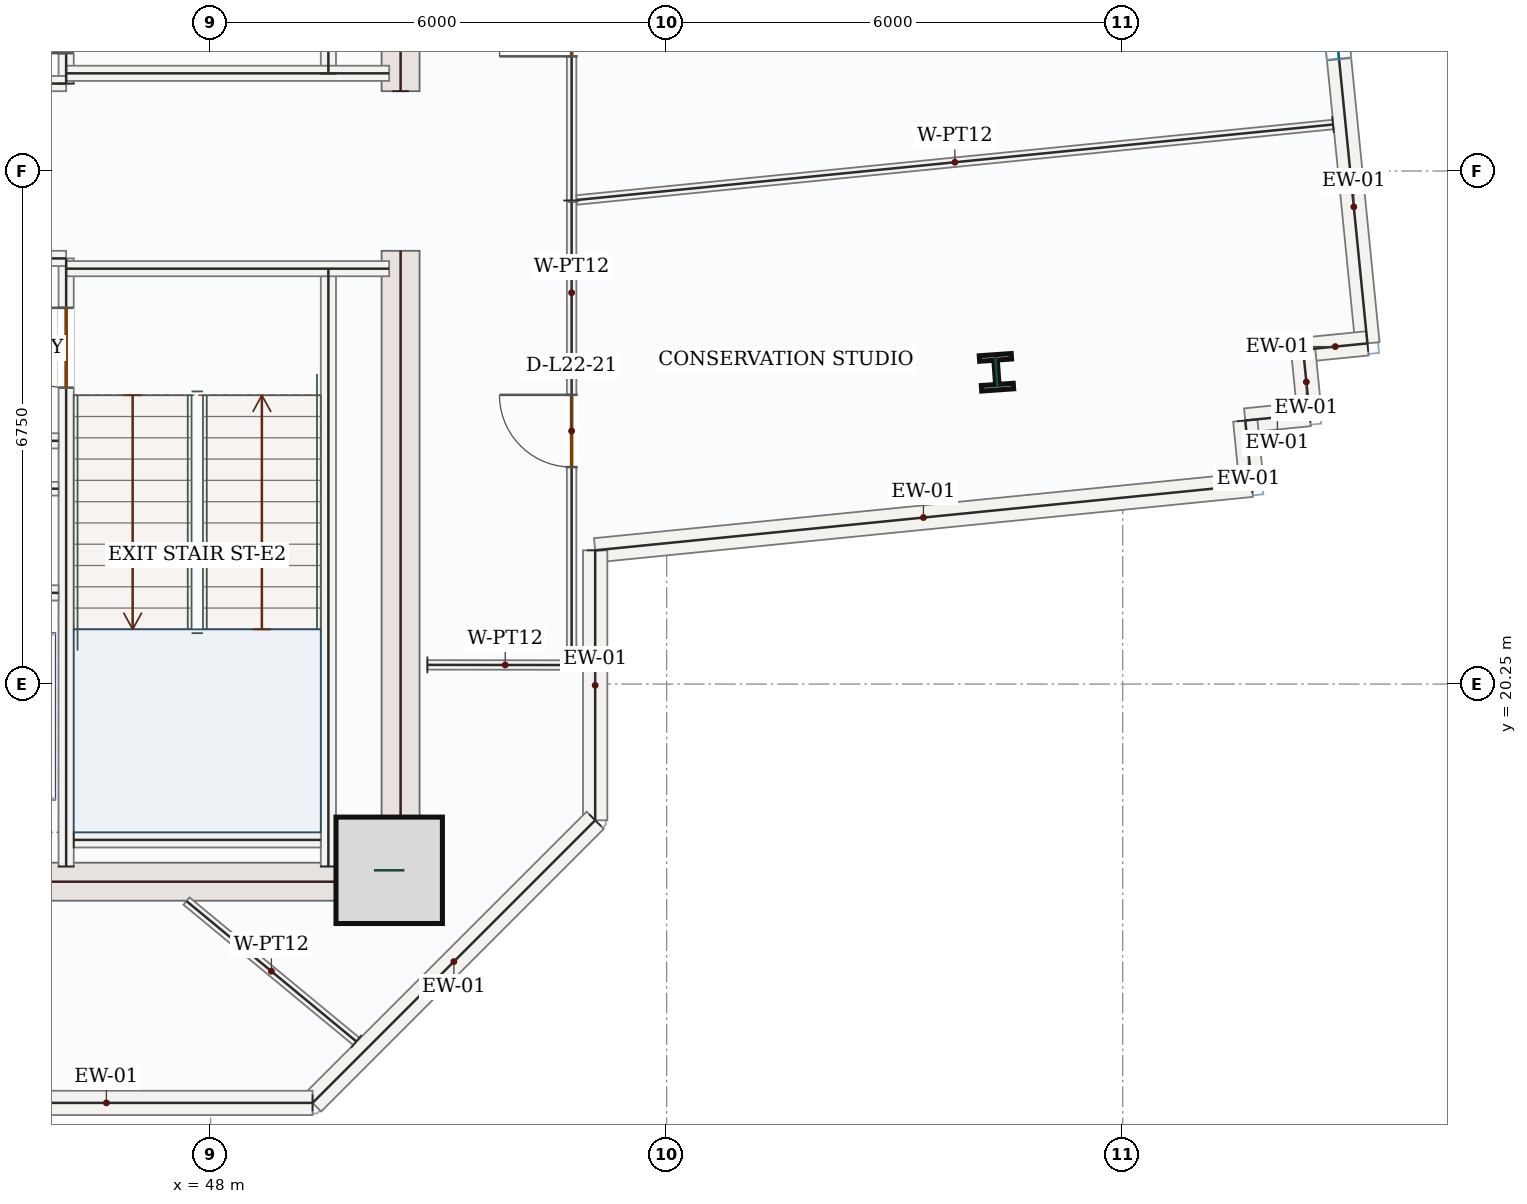
"""IFC4 building model, lengths in metres.
Left out: names, types, materials, properties, quantities, classifications, styles, units other than length and angle.
Written with IfcOpenShell. Run it as: python <this file> out.ifc"""

import sys

from ifc_helpers import new_model, si_unit, direction, frame, frame_2d, origin, origin_2d, place, context, subcontext, project, spatial, rectangle, i_section, extrude, source, transform, mapped, element, fill, save


model = new_model("IFC4")
c1 = context("Model", 3, precision=1e-05, world=origin(), true_north=direction((0.0, 1.0)))
c2 = subcontext(c1, "Body", "Model", "MODEL_VIEW")
j1 = project(units=[si_unit("LENGTHUNIT", "METRE"), si_unit("PLANEANGLEUNIT", "RADIAN")], contexts=[c1])
p1 = place(None, origin())
s1 = spatial("IfcSite", under=j1, at=p1, CompositionType="ELEMENT")
p2 = place(p1, origin())
s2 = spatial("IfcBuilding", under=s1, at=p2, CompositionType="ELEMENT")
p3 = place(p2, frame((0.0, 0.0, 100.5)))
s3 = spatial("IfcBuildingStorey", under=s2, at=p3, CompositionType="ELEMENT", Elevation=100.5)
m1 = source(origin(), c2, "Body", "SweptSolid", [
    extrude(rectangle(XDim=8.55, YDim=0.5, at=frame_2d((4.275, 0.0))), origin(), (0.0, 0.0, 1.0), 3.95),
])
for number, where, z_axis, x_axis in (
    (1, (50.5, 17.4, 0.0), (0.0, 0.0, 1.0), (0.0, 1.0, 0.0)),
    (2, (50.5, 28.05, 0.0), (0.0, 0.0, 1.0), (0.0, 1.0, 0.0)),
):
    element("IfcWall", number, at=place(p3, frame(where, z_axis=z_axis, x_axis=x_axis)), inside=s3, PredefinedType="SHEAR", context=c2, shape_type="MappedRepresentation", body=[
        mapped(m1, transform((0.0, 0.0, 0.0), x_axis=(1.0, 0.0, 0.0), y_axis=(0.0, 1.0, 0.0), z_axis=(0.0, 0.0, 1.0), scale=1.0)),
    ])
m2 = source(origin(), c2, "Body", "SweptSolid", [
    extrude(rectangle(XDim=7.0, YDim=0.5, at=frame_2d((3.5, 0.0))), origin(), (0.0, 0.0, 1.0), 3.95),
])
p4 = place(p3, frame((43.25, 17.65, 0.0), z_axis=(0.0, 0.0, 1.0), x_axis=(1.0, 0.0, 0.0)))
e3 = element("IfcWall", 3, at=p4, inside=s3, PredefinedType="SHEAR", context=c2, shape_type="MappedRepresentation", body=[
    mapped(m2, transform((0.0, 0.0, 0.0), x_axis=(1.0, 0.0, 0.0), y_axis=(0.0, 1.0, 0.0), z_axis=(0.0, 0.0, 1.0), scale=1.0)),
])
m3 = source(origin(), c2, "Body", "SweptSolid", [
    extrude(rectangle(XDim=1.4, YDim=1.4, at=origin_2d()), origin(), (0.0, 0.0, 1.0), 4.2),
])
p5 = place(p3, frame((50.35, 17.8, 0.0), z_axis=(0.0, 0.0, 1.0), x_axis=(1.0, 0.0, 0.0)))
e4 = element("IfcColumn", 4, at=p5, inside=s3, PredefinedType="COLUMN", context=c2, shape_type="MappedRepresentation", body=[
    mapped(m3, transform((0.0, 0.0, 0.0), x_axis=(1.0, 0.0, 0.0), y_axis=(0.0, 1.0, 0.0), z_axis=(0.0, 0.0, 1.0), scale=1.0)),
])
m4 = source(origin(), c2, "Body", "SweptSolid", [
    extrude(i_section(OverallWidth=0.421, OverallDepth=0.465, WebThickness=0.045, FlangeThickness=0.073, FilletRadius=0.018, at=origin_2d()), origin(), (0.0, 0.0, 1.0), 4.2),
])
p6 = place(p3, frame((58.339, 24.352, 0.0), z_axis=(0.0, 0.0, 1.0), x_axis=(0.99756405026, 0.069756473744, 0.0)))
e5 = element("IfcColumn", 5, at=p6, inside=s3, PredefinedType="COLUMN", context=c2, shape_type="MappedRepresentation", body=[
    mapped(m4, transform((0.0, 0.0, 0.0), x_axis=(1.0, 0.0, 0.0), y_axis=(0.0, 1.0, 0.0), z_axis=(0.0, 0.0, 1.0), scale=1.0)),
])
p7 = place(p3, frame((62.235, 34.603, 0.0), z_axis=(0.0, 0.0, 1.0), x_axis=(0.099303907908, -0.995057151059, 0.0)))
e6 = element("IfcWall", 6, at=p7, inside=s3, PredefinedType="SOLIDWALL", context=c2, shape_type="SweptSolid", body=[
    extrude(rectangle(XDim=9.92, YDim=0.32, at=frame_2d((4.96, 0.0))), origin(), (0.0, 0.0, 1.0), 3.95),
])
p8 = place(p7, frame((3.76, 0.0, 0.85)))
e7 = element("IfcOpeningElement", 7, at=p8, cuts=e6, PredefinedType="OPENING", context=c2, shape_type="SweptSolid", body=[
    extrude(rectangle(XDim=2.4, YDim=1.8, at=frame_2d((1.2, 0.9))), frame((0.0, 0.17, 0.0), z_axis=(0.0, -1.0, 0.0), x_axis=(1.0, 0.0, 0.0)), (0.0, 0.0, 1.0), 0.34),
])
m5 = source(origin(), c2, "Body", "SweptSolid", [
    extrude(rectangle(XDim=0.85, YDim=0.32, at=frame_2d((0.425, 0.0))), origin(), (0.0, 0.0, 1.0), 3.95),
])
for number, where, z_axis, x_axis in (
    (8, (63.22, 24.732, 0.0), (0.0, 0.0, 1.0), (-0.995, -0.099, 0.0)),
    (9, (62.374, 24.648, 0.0), (0.0, 0.0, 1.0), (0.099, -0.995, 0.0)),
    (10, (62.458, 23.802, 0.0), (0.0, 0.0, 1.0), (-0.995, -0.099, 0.0)),
    (11, (61.613, 23.718, 0.0), (0.0, 0.0, 1.0), (0.099, -0.995, 0.0)),
):
    element("IfcWall", number, at=place(p3, frame(where, z_axis=z_axis, x_axis=x_axis)), inside=s3, PredefinedType="SOLIDWALL", context=c2, shape_type="MappedRepresentation", body=[
        mapped(m5, transform((0.0, 0.0, 0.0), x_axis=(1.0, 0.0, 0.0), y_axis=(0.0, 1.0, 0.0), z_axis=(0.0, 0.0, 1.0), scale=1.0)),
    ])
m6 = source(origin(), c2, "Body", "SweptSolid", [
    extrude(rectangle(XDim=8.68, YDim=0.32, at=frame_2d((4.34, 0.0))), origin(), (0.0, 0.0, 1.0), 3.95),
])
p9 = place(p3, frame((61.697, 22.872, 0.0), z_axis=(0.0, 0.0, 1.0), x_axis=(-0.995055831351, -0.099317130918, 0.0)))
e12 = element("IfcWall", 12, at=p9, inside=s3, PredefinedType="SOLIDWALL", context=c2, shape_type="MappedRepresentation", body=[
    mapped(m6, transform((0.0, 0.0, 0.0), x_axis=(1.0, 0.0, 0.0), y_axis=(0.0, 1.0, 0.0), z_axis=(0.0, 0.0, 1.0), scale=1.0)),
])
m7 = source(origin(), c2, "Body", "SweptSolid", [
    extrude(rectangle(XDim=3.552, YDim=0.32, at=frame_2d((1.776, 0.0))), origin(), (0.0, 0.0, 1.0), 3.95),
])
p10 = place(p3, frame((53.06, 22.01, 0.0), z_axis=(0.0, 0.0, 1.0), x_axis=(0.0, -1.0, 0.0)))
e13 = element("IfcWall", 13, at=p10, inside=s3, PredefinedType="SOLIDWALL", context=c2, shape_type="MappedRepresentation", body=[
    mapped(m7, transform((0.0, 0.0, 0.0), x_axis=(1.0, 0.0, 0.0), y_axis=(0.0, 1.0, 0.0), z_axis=(0.0, 0.0, 1.0), scale=1.0)),
])
m8 = source(origin(), c2, "Body", "SweptSolid", [
    extrude(rectangle(XDim=5.258, YDim=0.32, at=frame_2d((2.629, 0.0))), origin(), (0.0, 0.0, 1.0), 3.95),
])
p11 = place(p3, frame((53.06, 18.458, 0.0), z_axis=(0.0, 0.0, 1.0), x_axis=(-0.707106781187, -0.707106781187, 0.0)))
e14 = element("IfcWall", 14, at=p11, inside=s3, PredefinedType="SOLIDWALL", context=c2, shape_type="MappedRepresentation", body=[
    mapped(m8, transform((0.0, 0.0, 0.0), x_axis=(1.0, 0.0, 0.0), y_axis=(0.0, 1.0, 0.0), z_axis=(0.0, 0.0, 1.0), scale=1.0)),
])
m9 = source(origin(), c2, "Body", "SweptSolid", [
    extrude(rectangle(XDim=5.425, YDim=0.32, at=frame_2d((2.713, 0.0))), origin(), (0.0, 0.0, 1.0), 3.95),
])
p12 = place(p3, frame((49.342, 14.74, 0.0), z_axis=(0.0, 0.0, 1.0), x_axis=(-1.0, 0.0, 0.0)))
e15 = element("IfcWall", 15, at=p12, inside=s3, PredefinedType="SOLIDWALL", context=c2, shape_type="MappedRepresentation", body=[
    mapped(m9, transform((0.0, 0.0, 0.0), x_axis=(1.0, 0.0, 0.0), y_axis=(0.0, 1.0, 0.0), z_axis=(0.0, 0.0, 1.0), scale=1.0)),
])
m10 = source(origin(), c2, "Body", "SweptSolid", [
    extrude(rectangle(XDim=7.87, YDim=0.2, at=frame_2d((3.935, 0.0))), origin(), (0.0, 0.0, 1.0), 3.95),
])
for number, where, z_axis, x_axis in (
    (16, (49.55, 17.85, 0.0), (0.0, 0.0, 1.0), (0.0, 1.0, 0.0)),
    (17, (49.55, 28.28, 0.0), (0.0, 0.0, 1.0), (0.0, 1.0, 0.0)),
):
    element("IfcWall", number, at=place(p3, frame(where, z_axis=z_axis, x_axis=x_axis)), inside=s3, PredefinedType="SOLIDWALL", context=c2, shape_type="MappedRepresentation", body=[
        mapped(m10, transform((0.0, 0.0, 0.0), x_axis=(1.0, 0.0, 0.0), y_axis=(0.0, 1.0, 0.0), z_axis=(0.0, 0.0, 1.0), scale=1.0)),
    ])
p13 = place(p3, frame((46.1, 17.85, 0.0), z_axis=(0.0, 0.0, 1.0), x_axis=(0.0, 1.0, 0.0)))
e18 = element("IfcWall", 18, at=p13, inside=s3, PredefinedType="SOLIDWALL", context=c2, shape_type="SweptSolid", body=[
    extrude(rectangle(XDim=8.0, YDim=0.2, at=frame_2d((4.0, 0.0))), origin(), (0.0, 0.0, 1.0), 3.95),
])
p14 = place(p13, frame((6.3, 0.0, 0.0)))
e19 = element("IfcOpeningElement", 19, at=p14, cuts=e18, PredefinedType="OPENING", context=c2, shape_type="SweptSolid", body=[
    extrude(rectangle(XDim=1.05, YDim=2.15, at=frame_2d((0.525, 1.075))), frame((0.0, 0.11, 0.0), z_axis=(0.0, -1.0, 0.0), x_axis=(1.0, 0.0, 0.0)), (0.0, 0.0, 1.0), 0.22),
])
p15 = place(p3, frame((46.1, 28.15, 0.0), z_axis=(0.0, 0.0, 1.0), x_axis=(0.0, 1.0, 0.0)))
e20 = element("IfcWall", 20, at=p15, inside=s3, PredefinedType="SOLIDWALL", context=c2, shape_type="SweptSolid", body=[
    extrude(rectangle(XDim=8.0, YDim=0.2, at=frame_2d((4.0, 0.0))), origin(), (0.0, 0.0, 1.0), 3.95),
])
p16 = place(p15, frame((0.4, 0.0, 0.0)))
e21 = element("IfcOpeningElement", 21, at=p16, cuts=e20, PredefinedType="OPENING", context=c2, shape_type="SweptSolid", body=[
    extrude(rectangle(XDim=1.05, YDim=2.15, at=frame_2d((0.525, 1.075))), frame((0.0, 0.11, 0.0), z_axis=(0.0, -1.0, 0.0), x_axis=(1.0, 0.0, 0.0)), (0.0, 0.0, 1.0), 0.22),
])
m11 = source(origin(), c2, "Body", "SweptSolid", [
    extrude(rectangle(XDim=3.0, YDim=0.2, at=frame_2d((1.5, 0.0))), origin(), (0.0, 0.0, 1.0), 3.95),
])
p17 = place(p3, frame((43.1, 25.85, 0.0), z_axis=(0.0, 0.0, 1.0), x_axis=(1.0, 0.0, 0.0)))
e22 = element("IfcWall", 22, at=p17, inside=s3, PredefinedType="SOLIDWALL", context=c2, shape_type="MappedRepresentation", body=[
    mapped(m11, transform((0.0, 0.0, 0.0), x_axis=(1.0, 0.0, 0.0), y_axis=(0.0, 1.0, 0.0), z_axis=(0.0, 0.0, 1.0), scale=1.0)),
])
m12 = source(origin(), c2, "Body", "SweptSolid", [
    extrude(rectangle(XDim=4.25, YDim=0.2, at=frame_2d((2.125, 0.0))), origin(), (0.0, 0.0, 1.0), 3.95),
])
p18 = place(p3, frame((46.1, 25.715, 0.0), z_axis=(0.0, 0.0, 1.0), x_axis=(1.0, 0.0, 0.0)))
e23 = element("IfcWall", 23, at=p18, inside=s3, PredefinedType="SOLIDWALL", context=c2, shape_type="MappedRepresentation", body=[
    mapped(m12, transform((0.0, 0.0, 0.0), x_axis=(1.0, 0.0, 0.0), y_axis=(0.0, 1.0, 0.0), z_axis=(0.0, 0.0, 1.0), scale=1.0)),
])
p19 = place(p3, frame((43.1, 28.15, 0.0), z_axis=(0.0, 0.0, 1.0), x_axis=(1.0, 0.0, 0.0)))
e24 = element("IfcWall", 24, at=p19, inside=s3, PredefinedType="SOLIDWALL", context=c2, shape_type="MappedRepresentation", body=[
    mapped(m11, transform((0.0, 0.0, 0.0), x_axis=(1.0, 0.0, 0.0), y_axis=(0.0, 1.0, 0.0), z_axis=(0.0, 0.0, 1.0), scale=1.0)),
])
p20 = place(p3, frame((46.1, 28.285, 0.0), z_axis=(0.0, 0.0, 1.0), x_axis=(1.0, 0.0, 0.0)))
e25 = element("IfcWall", 25, at=p20, inside=s3, PredefinedType="SOLIDWALL", context=c2, shape_type="MappedRepresentation", body=[
    mapped(m12, transform((0.0, 0.0, 0.0), x_axis=(1.0, 0.0, 0.0), y_axis=(0.0, 1.0, 0.0), z_axis=(0.0, 0.0, 1.0), scale=1.0)),
])
m13 = source(origin(), c2, "Body", "SweptSolid", [
    extrude(rectangle(XDim=3.25, YDim=0.2, at=frame_2d((1.625, 0.0))), origin(), (0.0, 0.0, 1.0), 3.95),
])
p21 = place(p3, frame((46.2, 18.2, 0.0), z_axis=(0.0, 0.0, 1.0), x_axis=(1.0, 0.0, 0.0)))
e26 = element("IfcWall", 26, at=p21, inside=s3, PredefinedType="SOLIDWALL", context=c2, shape_type="MappedRepresentation", body=[
    mapped(m13, transform((0.0, 0.0, 0.0), x_axis=(1.0, 0.0, 0.0), y_axis=(0.0, 1.0, 0.0), z_axis=(0.0, 0.0, 1.0), scale=1.0)),
])
m14 = source(origin(), c2, "Body", "SweptSolid", [
    extrude(rectangle(XDim=2.75, YDim=0.2, at=frame_2d((1.375, 0.0))), origin(), (0.0, 0.0, 1.0), 3.95),
])
for number, where, z_axis, x_axis in (
    (27, (43.25, 23.45, 0.0), (0.0, 0.0, 1.0), (1.0, 0.0, 0.0)),
    (28, (43.25, 21.45, 0.0), (0.0, 0.0, 1.0), (1.0, 0.0, 0.0)),
):
    element("IfcWall", number, at=place(p3, frame(where, z_axis=z_axis, x_axis=x_axis)), inside=s3, PredefinedType="SOLIDWALL", context=c2, shape_type="MappedRepresentation", body=[
        mapped(m14, transform((0.0, 0.0, 0.0), x_axis=(1.0, 0.0, 0.0), y_axis=(0.0, 1.0, 0.0), z_axis=(0.0, 0.0, 1.0), scale=1.0)),
    ])
m15 = source(origin(), c2, "Body", "SweptSolid", [
    extrude(rectangle(XDim=2.75, YDim=0.18, at=frame_2d((1.375, 0.0))), origin(), (0.0, 0.0, 1.0), 3.95),
])
p22 = place(p3, frame((43.25, 22.82, 0.0), z_axis=(0.0, 0.0, 1.0), x_axis=(1.0, 0.0, 0.0)))
e29 = element("IfcWall", 29, at=p22, inside=s3, PredefinedType="PARTITIONING", context=c2, shape_type="MappedRepresentation", body=[
    mapped(m15, transform((0.0, 0.0, 0.0), x_axis=(1.0, 0.0, 0.0), y_axis=(0.0, 1.0, 0.0), z_axis=(0.0, 0.0, 1.0), scale=1.0)),
])
p23 = place(p3, frame((52.75, 26.612, 0.0), z_axis=(0.0, 0.0, 1.0), x_axis=(0.0, 1.0, 0.0)))
e30 = element("IfcWall", 30, at=p23, inside=s3, PredefinedType="PARTITIONING", context=c2, shape_type="SweptSolid", body=[
    extrude(rectangle(XDim=4.743, YDim=0.125, at=frame_2d((2.372, 0.0))), origin(), (0.0, 0.0, 1.0), 3.95),
])
p24 = place(p23, frame((1.897, 0.0, 0.0)))
e31 = element("IfcOpeningElement", 31, at=p24, cuts=e30, PredefinedType="OPENING", context=c2, shape_type="SweptSolid", body=[
    extrude(rectangle(XDim=0.95, YDim=2.15, at=frame_2d((0.475, 1.075))), frame((0.0, 0.073, 0.0), z_axis=(0.0, -1.0, 0.0), x_axis=(1.0, 0.0, 0.0)), (0.0, 0.0, 1.0), 0.145),
])
m16 = source(origin(), c2, "Body", "SweptSolid", [
    extrude(rectangle(XDim=9.999, YDim=0.125, at=frame_2d((5.0, 0.0))), origin(), (0.0, 0.0, 1.0), 3.95),
])
p25 = place(p3, frame((62.767, 27.612, 0.0), z_axis=(0.0, 0.0, 1.0), x_axis=(-0.995054581391, -0.099329653443, 0.0)))
e32 = element("IfcWall", 32, at=p25, inside=s3, PredefinedType="PARTITIONING", context=c2, shape_type="MappedRepresentation", body=[
    mapped(m16, transform((0.0, 0.0, 0.0), x_axis=(1.0, 0.0, 0.0), y_axis=(0.0, 1.0, 0.0), z_axis=(0.0, 0.0, 1.0), scale=1.0)),
])
m17 = source(origin(), c2, "Body", "SweptSolid", [
    extrude(rectangle(XDim=2.047, YDim=0.125, at=frame_2d((1.024, 0.0))), origin(), (0.0, 0.0, 1.0), 3.95),
])
p26 = place(p3, frame((50.853, 20.502, 0.0), z_axis=(0.0, 0.0, 1.0), x_axis=(0.999999289016, -0.001192462782, 0.0)))
e33 = element("IfcWall", 33, at=p26, inside=s3, PredefinedType="PARTITIONING", context=c2, shape_type="MappedRepresentation", body=[
    mapped(m17, transform((0.0, 0.0, 0.0), x_axis=(1.0, 0.0, 0.0), y_axis=(0.0, 1.0, 0.0), z_axis=(0.0, 0.0, 1.0), scale=1.0)),
])
p27 = place(p3, frame((52.75, 20.568, 0.0), z_axis=(0.0, 0.0, 1.0), x_axis=(0.0, 1.0, 0.0)))
e34 = element("IfcWall", 34, at=p27, inside=s3, PredefinedType="PARTITIONING", context=c2, shape_type="SweptSolid", body=[
    extrude(rectangle(XDim=6.024, YDim=0.125, at=frame_2d((3.012, 0.0))), origin(), (0.0, 0.0, 1.0), 3.95),
])
p28 = place(p27, frame((2.537, 0.0, 0.0)))
e35 = element("IfcOpeningElement", 35, at=p28, cuts=e34, PredefinedType="OPENING", context=c2, shape_type="SweptSolid", body=[
    extrude(rectangle(XDim=0.95, YDim=2.15, at=frame_2d((0.475, 1.075))), frame((0.0, 0.073, 0.0), z_axis=(0.0, -1.0, 0.0), x_axis=(1.0, 0.0, 0.0)), (0.0, 0.0, 1.0), 0.145),
])
m18 = source(origin(), c2, "Body", "SweptSolid", [
    extrude(rectangle(XDim=2.898, YDim=0.125, at=frame_2d((1.449, 0.0))), origin(), (0.0, 0.0, 1.0), 3.95),
])
p29 = place(p3, frame((49.917, 15.549, 0.0), z_axis=(0.0, 0.0, 1.0), x_axis=(-0.770859236659, 0.637005523726, 0.0)))
e36 = element("IfcWall", 36, at=p29, inside=s3, PredefinedType="PARTITIONING", context=c2, shape_type="MappedRepresentation", body=[
    mapped(m18, transform((0.0, 0.0, 0.0), x_axis=(1.0, 0.0, 0.0), y_axis=(0.0, 1.0, 0.0), z_axis=(0.0, 0.0, 1.0), scale=1.0)),
])
m19 = source(origin(), c2, "Body", "SweptSolid", [
    extrude(rectangle(XDim=2.4, YDim=1.8, at=frame_2d((1.2, 0.9))), frame((0.0, 0.03, 0.0), z_axis=(0.0, -1.0, 0.0), x_axis=(1.0, 0.0, 0.0)), (0.0, 0.0, 1.0), 0.06),
])
p30 = place(p8, origin())
e37 = element("IfcWindow", 37, at=p30, inside=s3, PartitioningType="DOUBLE_PANEL_VERTICAL", PredefinedType="WINDOW", context=c2, shape_type="MappedRepresentation", body=[
    mapped(m19, transform((0.0, 0.0, 0.0), x_axis=(1.0, 0.0, 0.0), y_axis=(0.0, 1.0, 0.0), z_axis=(0.0, 0.0, 1.0), scale=1.0)),
])
fill(e7, e37)
m20 = source(origin(), c2, "Body", "SweptSolid", [
    extrude(rectangle(XDim=1.05, YDim=2.15, at=frame_2d((0.525, 1.075))), frame((0.0, 0.025, 0.0), z_axis=(0.0, -1.0, 0.0), x_axis=(1.0, 0.0, 0.0)), (0.0, 0.0, 1.0), 0.05),
])
p31 = place(p16, origin())
e38 = element("IfcDoor", 38, at=p31, inside=s3, OperationType="SINGLE_SWING_LEFT", PredefinedType="DOOR", context=c2, shape_type="MappedRepresentation", body=[
    mapped(m20, transform((0.0, 0.0, 0.0), x_axis=(1.0, 0.0, 0.0), y_axis=(0.0, 1.0, 0.0), z_axis=(0.0, 0.0, 1.0), scale=1.0)),
])
fill(e21, e38)
p32 = place(p14, origin())
e39 = element("IfcDoor", 39, at=p32, inside=s3, OperationType="SINGLE_SWING_RIGHT", PredefinedType="DOOR", context=c2, shape_type="MappedRepresentation", body=[
    mapped(m20, transform((0.0, 0.0, 0.0), x_axis=(1.0, 0.0, 0.0), y_axis=(0.0, 1.0, 0.0), z_axis=(0.0, 0.0, 1.0), scale=1.0)),
])
fill(e19, e39)
m21 = source(origin(), c2, "Body", "SweptSolid", [
    extrude(rectangle(XDim=0.95, YDim=2.15, at=frame_2d((0.475, 1.075))), frame((0.0, 0.025, 0.0), z_axis=(0.0, -1.0, 0.0), x_axis=(1.0, 0.0, 0.0)), (0.0, 0.0, 1.0), 0.05),
])
p33 = place(p28, origin())
e40 = element("IfcDoor", 40, at=p33, inside=s3, OperationType="SINGLE_SWING_RIGHT", PredefinedType="DOOR", context=c2, shape_type="MappedRepresentation", body=[
    mapped(m21, transform((0.0, 0.0, 0.0), x_axis=(1.0, 0.0, 0.0), y_axis=(0.0, 1.0, 0.0), z_axis=(0.0, 0.0, 1.0), scale=1.0)),
])
fill(e35, e40)
p34 = place(p24, origin())
e41 = element("IfcDoor", 41, at=p34, inside=s3, OperationType="SINGLE_SWING_LEFT", PredefinedType="DOOR", context=c2, shape_type="MappedRepresentation", body=[
    mapped(m21, transform((0.0, 0.0, 0.0), x_axis=(1.0, 0.0, 0.0), y_axis=(0.0, 1.0, 0.0), z_axis=(0.0, 0.0, 1.0), scale=1.0)),
])
fill(e31, e41)
save(model, sys.argv[1])
